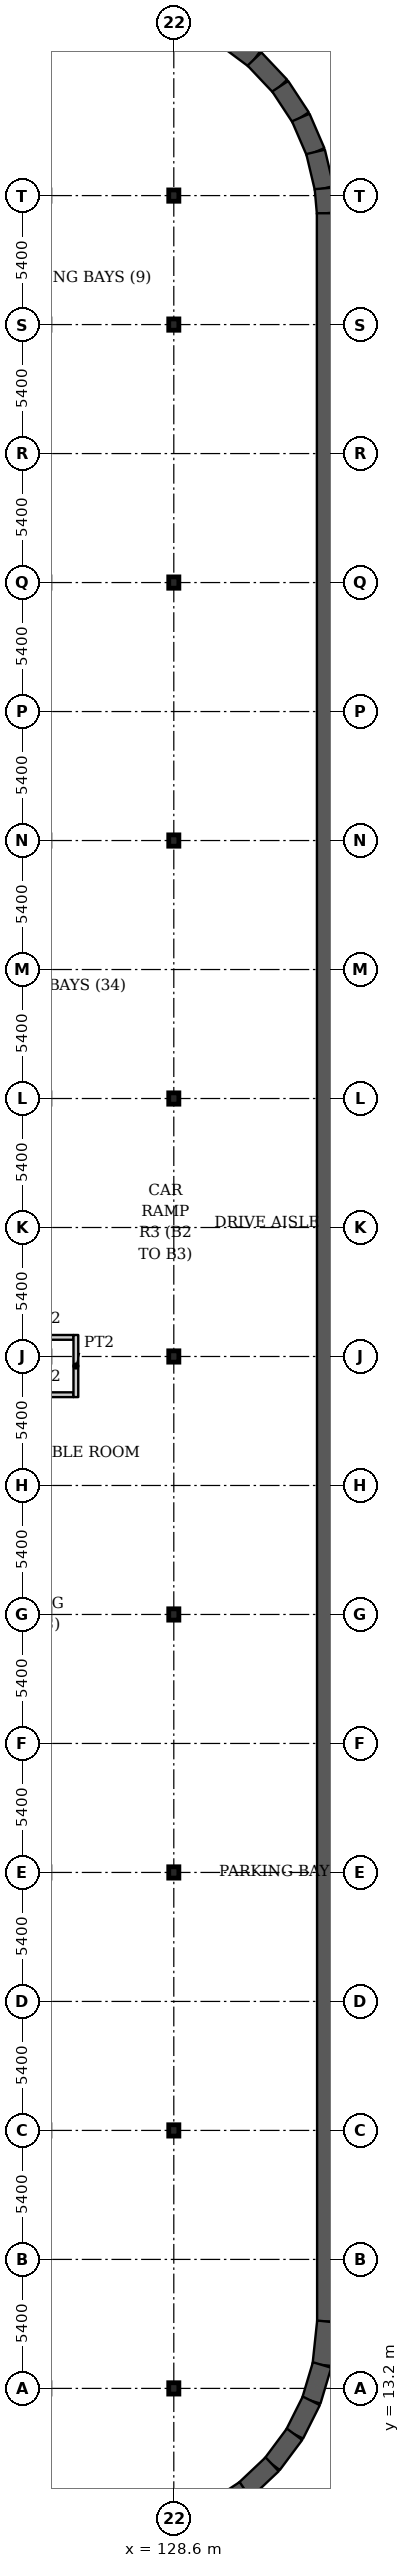
"""IFC4 building model, lengths in metres.
Left out: names, types, materials, properties, quantities, classifications, styles, units other than length and angle.
Written with IfcOpenShell. Run it as: python <this file> out.ifc"""

import sys

from ifc_helpers import new_model, si_unit, direction, frame, frame_2d, origin, origin_2d, place, context, subcontext, project, spatial, rectangle, i_section, extrude, element, save


model = new_model("IFC4")
c1 = context("Model", 3, precision=1e-05, world=origin(), true_north=direction((0.0, 1.0)))
c2 = subcontext(c1, "Body", "Model", "MODEL_VIEW")
j1 = project(units=[si_unit("LENGTHUNIT", "METRE"), si_unit("PLANEANGLEUNIT", "RADIAN")], contexts=[c1])
p1 = place(None, origin())
s1 = spatial("IfcSite", under=j1, at=p1, CompositionType="ELEMENT")
p2 = place(p1, origin())
s2 = spatial("IfcBuilding", under=s1, at=p2, CompositionType="ELEMENT")
p3 = place(p2, frame((0.0, 0.0, -15.0)))
s3 = spatial("IfcBuildingStorey", under=s2, at=p3, CompositionType="ELEMENT", Elevation=-15.0)
for number, where, z_axis, x_axis in (
    (1, (128.6, 13.2, 0.0), (0.0, 0.0, 1.0), (1.0, 0.0, 0.0)),
    (2, (128.6, 24.0, 0.0), (0.0, 0.0, 1.0), (1.0, 0.0, 0.0)),
    (3, (128.6, 34.8, 0.0), (0.0, 0.0, 1.0), (1.0, 0.0, 0.0)),
    (4, (128.6, 45.6, 0.0), (0.0, 0.0, 1.0), (1.0, 0.0, 0.0)),
    (5, (128.6, 56.4, 0.0), (0.0, 0.0, 1.0), (1.0, 0.0, 0.0)),
    (6, (128.6, 67.2, 0.0), (0.0, 0.0, 1.0), (1.0, 0.0, 0.0)),
    (7, (128.6, 78.0, 0.0), (0.0, 0.0, 1.0), (1.0, 0.0, 0.0)),
    (8, (128.6, 88.8, 0.0), (0.0, 0.0, 1.0), (1.0, 0.0, 0.0)),
    (9, (128.6, 99.6, 0.0), (0.0, 0.0, 1.0), (1.0, 0.0, 0.0)),
    (10, (128.6, 105.0, 0.0), (0.0, 0.0, 1.0), (1.0, 0.0, 0.0)),
):
    element("IfcColumn", number, at=place(p3, frame(where, z_axis=z_axis, x_axis=x_axis)), inside=s3, PredefinedType="COLUMN", context=c2, shape_type="SweptSolid", body=[
        extrude(i_section(OverallWidth=0.424, OverallDepth=0.474, WebThickness=0.048, FlangeThickness=0.077, FilletRadius=0.014, at=origin_2d()), origin(), (0.0, 0.0, 1.0), 5.0),
    ])
p4 = place(p3, frame((130.721, 111.654, 0.0), z_axis=(0.0, 0.0, 1.0), x_axis=(0.801771638905, -0.597630520512, 0.0)))
e11 = element("IfcWall", 11, at=p4, inside=s3, PredefinedType="SOLIDWALL", context=c2, shape_type="SweptSolid", body=[
    extrude(rectangle(XDim=1.568, YDim=0.8, at=frame_2d((0.784, 0.0))), origin(), (0.0, 0.0, 1.0), 5.0),
])
p5 = place(p3, frame((131.978, 110.717, 0.0), z_axis=(0.0, 0.0, 1.0), x_axis=(0.686641833089, -0.726995868662, 0.0)))
e12 = element("IfcWall", 12, at=p5, inside=s3, PredefinedType="SOLIDWALL", context=c2, shape_type="SweptSolid", body=[
    extrude(rectangle(XDim=1.567, YDim=0.8, at=frame_2d((0.783, 0.0))), origin(), (0.0, 0.0, 1.0), 5.0),
])
p6 = place(p3, frame((133.054, 109.578, 0.0), z_axis=(0.0, 0.0, 1.0), x_axis=(0.549333272834, -0.835603348101, 0.0)))
e13 = element("IfcWall", 13, at=p6, inside=s3, PredefinedType="SOLIDWALL", context=c2, shape_type="SweptSolid", body=[
    extrude(rectangle(XDim=1.568, YDim=0.8, at=frame_2d((0.784, 0.0))), origin(), (0.0, 0.0, 1.0), 5.0),
])
p7 = place(p3, frame((133.915, 108.268, 0.0), z_axis=(0.0, 0.0, 1.0), x_axis=(0.396155493925, -0.918183437355, 0.0)))
e14 = element("IfcWall", 14, at=p7, inside=s3, PredefinedType="SOLIDWALL", context=c2, shape_type="SweptSolid", body=[
    extrude(rectangle(XDim=1.567, YDim=0.8, at=frame_2d((0.784, 0.0))), origin(), (0.0, 0.0, 1.0), 5.0),
])
p8 = place(p3, frame((134.536, 106.829, 0.0), z_axis=(0.0, 0.0, 1.0), x_axis=(0.230834833469, -0.972992949439, 0.0)))
e15 = element("IfcWall", 15, at=p8, inside=s3, PredefinedType="SOLIDWALL", context=c2, shape_type="SweptSolid", body=[
    extrude(rectangle(XDim=1.569, YDim=0.8, at=frame_2d((0.784, 0.0))), origin(), (0.0, 0.0, 1.0), 5.0),
])
p9 = place(p3, frame((134.898, 105.303, 0.0), z_axis=(0.0, 0.0, 1.0), x_axis=(0.087062712427, -0.996202832813, 0.0)))
e16 = element("IfcWall", 16, at=p9, inside=s3, PredefinedType="SOLIDWALL", context=c2, shape_type="SweptSolid", body=[
    extrude(rectangle(XDim=1.046, YDim=0.8, at=frame_2d((0.523, 0.0))), origin(), (0.0, 0.0, 1.0), 5.0),
])
p10 = place(p3, frame((134.989, 104.261, 0.0), z_axis=(0.0, 0.0, 1.0), x_axis=(0.000124475473, -0.999999992253, 0.0)))
e17 = element("IfcWall", 17, at=p10, inside=s3, PredefinedType="SOLIDWALL", context=c2, shape_type="SweptSolid", body=[
    extrude(rectangle(XDim=88.261, YDim=0.8, at=frame_2d((44.13, 0.0))), origin(), (0.0, 0.0, 1.0), 5.0),
])
p11 = place(p3, frame((135.0, 16.0, 0.0), z_axis=(0.0, 0.0, 1.0), x_axis=(-0.105567043429, -0.994412187849, 0.0)))
e18 = element("IfcWall", 18, at=p11, inside=s3, PredefinedType="SOLIDWALL", context=c2, shape_type="SweptSolid", body=[
    extrude(rectangle(XDim=1.829, YDim=0.8, at=frame_2d((0.915, 0.0))), origin(), (0.0, 0.0, 1.0), 5.0),
])
p12 = place(p3, frame((134.807, 14.181, 0.0), z_axis=(0.0, 0.0, 1.0), x_axis=(-0.287147763375, -0.957886299092, 0.0)))
e19 = element("IfcWall", 19, at=p12, inside=s3, PredefinedType="SOLIDWALL", context=c2, shape_type="SweptSolid", body=[
    extrude(rectangle(XDim=1.567, YDim=0.8, at=frame_2d((0.783, 0.0))), origin(), (0.0, 0.0, 1.0), 5.0),
])
p13 = place(p3, frame((134.357, 12.68, 0.0), z_axis=(0.0, 0.0, 1.0), x_axis=(-0.448459314462, -0.893803246399, 0.0)))
e20 = element("IfcWall", 20, at=p13, inside=s3, PredefinedType="SOLIDWALL", context=c2, shape_type="SweptSolid", body=[
    extrude(rectangle(XDim=1.567, YDim=0.8, at=frame_2d((0.784, 0.0))), origin(), (0.0, 0.0, 1.0), 5.0),
])
p14 = place(p3, frame((133.654, 11.279, 0.0), z_axis=(0.0, 0.0, 1.0), x_axis=(-0.597630520512, -0.801771638905, 0.0)))
e21 = element("IfcWall", 21, at=p14, inside=s3, PredefinedType="SOLIDWALL", context=c2, shape_type="SweptSolid", body=[
    extrude(rectangle(XDim=1.568, YDim=0.8, at=frame_2d((0.784, 0.0))), origin(), (0.0, 0.0, 1.0), 5.0),
])
p15 = place(p3, frame((132.717, 10.022, 0.0), z_axis=(0.0, 0.0, 1.0), x_axis=(-0.726995868662, -0.686641833089, 0.0)))
e22 = element("IfcWall", 22, at=p15, inside=s3, PredefinedType="SOLIDWALL", context=c2, shape_type="SweptSolid", body=[
    extrude(rectangle(XDim=1.567, YDim=0.8, at=frame_2d((0.783, 0.0))), origin(), (0.0, 0.0, 1.0), 5.0),
])
p16 = place(p3, frame((131.578, 8.946, 0.0), z_axis=(0.0, 0.0, 1.0), x_axis=(-0.835603348101, -0.549333272834, 0.0)))
e23 = element("IfcWall", 23, at=p16, inside=s3, PredefinedType="SOLIDWALL", context=c2, shape_type="SweptSolid", body=[
    extrude(rectangle(XDim=1.568, YDim=0.8, at=frame_2d((0.784, 0.0))), origin(), (0.0, 0.0, 1.0), 5.0),
])
for number, where, z_axis, x_axis in (
    (24, (122.15, 54.8, 0.0), (0.0, 0.0, 1.0), (1.0, 0.0, 0.0)),
    (25, (122.15, 57.2, 0.0), (0.0, 0.0, 1.0), (1.0, 0.0, 0.0)),
):
    element("IfcWall", number, at=place(p3, frame(where, z_axis=z_axis, x_axis=x_axis)), inside=s3, PredefinedType="PARTITIONING", context=c2, shape_type="SweptSolid", body=[
        extrude(rectangle(XDim=2.25, YDim=0.2, at=frame_2d((1.125, 0.0))), origin(), (0.0, 0.0, 1.0), 4.68),
    ])
p17 = place(p3, frame((124.5, 54.7, 0.0), z_axis=(0.0, 0.0, 1.0), x_axis=(0.0, 1.0, 0.0)))
e26 = element("IfcWall", 26, at=p17, inside=s3, PredefinedType="PARTITIONING", context=c2, shape_type="SweptSolid", body=[
    extrude(rectangle(XDim=2.6, YDim=0.2, at=frame_2d((1.3, 0.0))), origin(), (0.0, 0.0, 1.0), 4.68),
])
save(model, sys.argv[1])
